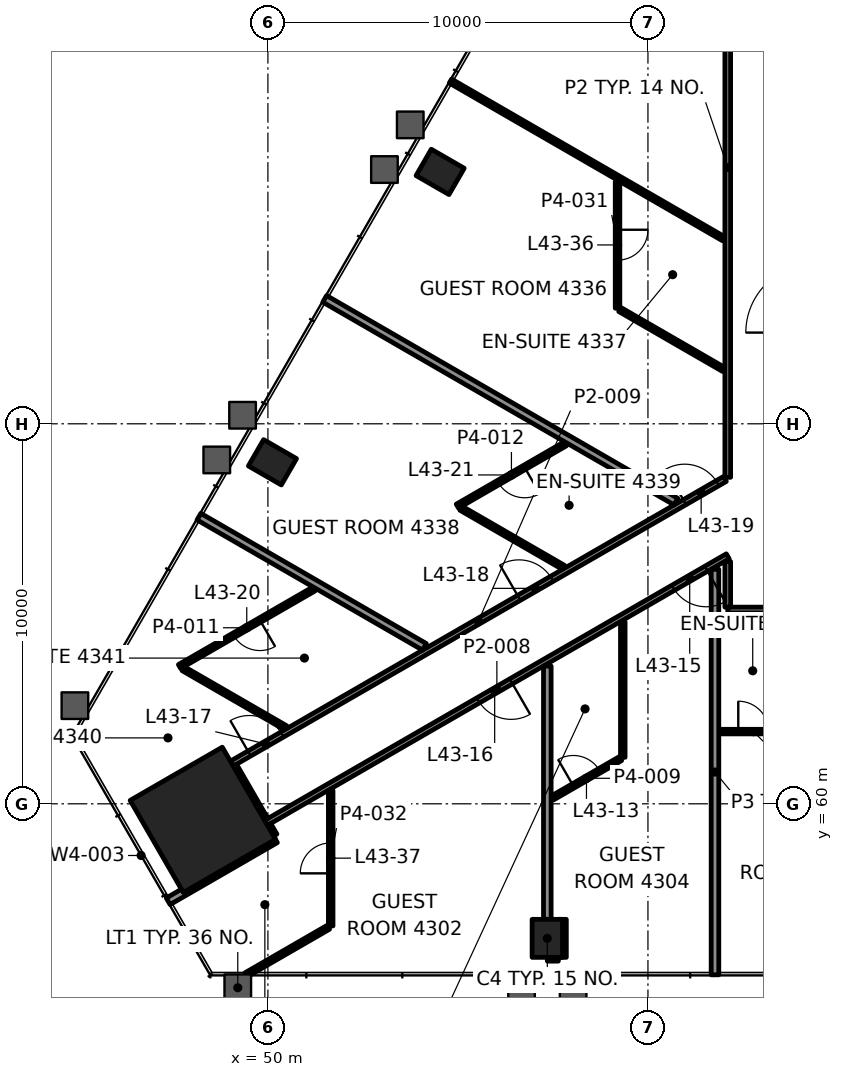
"""IFC4 building model, lengths in metres.
Left out: names, types, materials, properties, quantities, classifications, styles, units other than length and angle.
Written with IfcOpenShell. Run it as: python <this file> out.ifc"""

import sys

from ifc_helpers import new_model, si_unit, direction, frame, frame_2d, origin, origin_2d, place, context, subcontext, project, spatial, rectangle, hollow_rectangle, extrude, element, fill, save


model = new_model("IFC4")
c1 = context("Model", 3, precision=1e-05, world=origin(), true_north=direction((0.0, 1.0)))
c2 = subcontext(c1, "Body", "Model", "MODEL_VIEW")
j1 = project(units=[si_unit("LENGTHUNIT", "METRE"), si_unit("PLANEANGLEUNIT", "RADIAN")], contexts=[c1])
p1 = place(None, origin())
s1 = spatial("IfcSite", under=j1, at=p1, CompositionType="ELEMENT")
p2 = place(p1, origin())
s2 = spatial("IfcBuilding", under=s1, at=p2, CompositionType="ELEMENT")
p3 = place(p2, frame((0.0, 0.0, 187.0)))
s3 = spatial("IfcBuildingStorey", under=s2, at=p3, CompositionType="ELEMENT", Elevation=187.0)
p4 = place(p3, frame((48.287, 59.577, 0.0), z_axis=(0.0, 0.0, 1.0), x_axis=(0.5, -0.866025403784, 0.0)))
e1 = element("IfcColumn", 1, at=p4, inside=s3, PredefinedType="COLUMN", context=c2, shape_type="SweptSolid", body=[
    extrude(rectangle(XDim=2.8, YDim=2.8, at=origin_2d()), origin(), (0.0, 0.0, 1.0), 3.9),
])
for number, where, z_axis, x_axis in (
    (2, (57.352, 56.46, -0.0), (0.0, 0.0, 1.0), (1.0, 0.0, 0.0)),
    (3, (54.532, 76.628, -0.0), (0.0, 0.0, 1.0), (-0.5, -0.866, 0.0)),
    (4, (50.12, 68.987, -0.0), (0.0, 0.0, 1.0), (-0.5, -0.866, 0.0)),
):
    element("IfcColumn", number, at=place(p3, frame(where, z_axis=z_axis, x_axis=x_axis)), inside=s3, PredefinedType="COLUMN", context=c2, shape_type="SweptSolid", body=[
        extrude(hollow_rectangle(XDim=0.8, YDim=1.0, WallThickness=0.05, at=origin_2d()), origin(), (0.0, 0.0, 1.0), 3.9),
    ])
p5 = place(p3, frame((57.352, 55.96, 0.0), z_axis=(0.0, 0.0, 1.0), x_axis=(1.0, 0.0, 0.0)))
e5 = element("IfcWall", 5, at=p5, inside=s3, PredefinedType="PARTITIONING", context=c2, shape_type="SweptSolid", body=[
    extrude(rectangle(XDim=0.29, YDim=0.2, at=frame_2d((0.145, 0.0))), origin(), (0.0, 0.0, 1.0), 3.1),
])
p6 = place(p3, frame((61.864, 61.9, 0.0), z_axis=(0.0, 0.0, 1.0), x_axis=(1.0, 0.0, 0.0)))
e6 = element("IfcWall", 6, at=p6, inside=s3, PredefinedType="PARTITIONING", context=c2, shape_type="SweptSolid", body=[
    extrude(rectangle(XDim=1.825, YDim=0.12, at=frame_2d((0.913, 0.0))), origin(), (0.0, 0.0, 1.0), 3.1),
])
p7 = place(p6, frame((0.513, 0.0, 0.0)))
e7 = element("IfcOpeningElement", 7, at=p7, cuts=e6, PredefinedType="OPENING", context=c2, shape_type="SweptSolid", body=[
    extrude(rectangle(XDim=0.8, YDim=2.1, at=frame_2d((0.4, 1.05))), frame((0.0, 0.07, 0.0), z_axis=(0.0, -1.0, 0.0), x_axis=(1.0, 0.0, 0.0)), (0.0, 0.0, 1.0), 0.14),
])
p8 = place(p3, frame((87.9, 65.1, 0.0), z_axis=(0.0, 0.0, 1.0), x_axis=(-1.0, 0.0, 0.0)))
e8 = element("IfcWall", 8, at=p8, inside=s3, PredefinedType="PARTITIONING", context=c2, shape_type="SweptSolid", body=[
    extrude(rectangle(XDim=25.8, YDim=0.15, at=frame_2d((12.9, 0.0))), origin(), (0.0, 0.0, 1.0), 3.1),
])
p9 = place(p8, frame((2.264, 0.0, 0.0)))
e9 = element("IfcOpeningElement", 9, at=p9, cuts=e8, PredefinedType="OPENING", context=c2, shape_type="SweptSolid", body=[
    extrude(rectangle(XDim=1.0, YDim=2.1, at=frame_2d((0.5, 1.05))), frame((0.0, 0.085, 0.0), z_axis=(0.0, -1.0, 0.0), x_axis=(1.0, 0.0, 0.0)), (0.0, 0.0, 1.0), 0.17),
])
p10 = place(p8, frame((10.244, 0.0, 0.0)))
e10 = element("IfcOpeningElement", 10, at=p10, cuts=e8, PredefinedType="OPENING", context=c2, shape_type="SweptSolid", body=[
    extrude(rectangle(XDim=0.9, YDim=2.1, at=frame_2d((0.45, 1.05))), frame((0.0, 0.085, 0.0), z_axis=(0.0, -1.0, 0.0), x_axis=(1.0, 0.0, 0.0)), (0.0, 0.0, 1.0), 0.17),
])
p11 = place(p8, frame((18.135, 0.0, 0.0)))
e11 = element("IfcOpeningElement", 11, at=p11, cuts=e8, PredefinedType="OPENING", context=c2, shape_type="SweptSolid", body=[
    extrude(rectangle(XDim=1.0, YDim=2.1, at=frame_2d((0.5, 1.05))), frame((0.0, 0.085, 0.0), z_axis=(0.0, -1.0, 0.0), x_axis=(1.0, 0.0, 0.0)), (0.0, 0.0, 1.0), 0.17),
])
p12 = place(p8, frame((21.936, 0.0, 0.0)))
e12 = element("IfcOpeningElement", 12, at=p12, cuts=e8, PredefinedType="OPENING", context=c2, shape_type="SweptSolid", body=[
    extrude(rectangle(XDim=1.0, YDim=2.1, at=frame_2d((0.5, 1.05))), frame((0.0, 0.085, 0.0), z_axis=(0.0, -1.0, 0.0), x_axis=(1.0, 0.0, 0.0)), (0.0, 0.0, 1.0), 0.17),
])
p13 = place(p3, frame((49.424, 55.5, 0.0), z_axis=(0.0, 0.0, 1.0), x_axis=(0.866037780095, 0.499978562988, 0.0)))
e13 = element("IfcWall", 13, at=p13, inside=s3, PredefinedType="PARTITIONING", context=c2, shape_type="SweptSolid", body=[
    extrude(rectangle(XDim=2.503, YDim=0.12, at=frame_2d((1.251, 0.0))), origin(), (0.0, 0.0, 1.0), 3.1),
])
p14 = place(p3, frame((57.487, 60.155, 0.0), z_axis=(0.0, 0.0, 1.0), x_axis=(0.866018462269, 0.500012022864, 0.0)))
e14 = element("IfcWall", 14, at=p14, inside=s3, PredefinedType="PARTITIONING", context=c2, shape_type="SweptSolid", body=[
    extrude(rectangle(XDim=2.068, YDim=0.12, at=frame_2d((1.034, 0.0))), origin(), (0.0, 0.0, 1.0), 3.1),
])
p15 = place(p14, frame((0.634, 0.0, 0.0)))
e15 = element("IfcOpeningElement", 15, at=p15, cuts=e14, PredefinedType="OPENING", context=c2, shape_type="SweptSolid", body=[
    extrude(rectangle(XDim=0.8, YDim=2.1, at=frame_2d((0.4, 1.05))), frame((0.0, 0.07, 0.0), z_axis=(0.0, -1.0, 0.0), x_axis=(1.0, 0.0, 0.0)), (0.0, 0.0, 1.0), 0.14),
])
p16 = place(p3, frame((47.376, 57.435, 0.0), z_axis=(0.0, 0.0, 1.0), x_axis=(0.866035906198, 0.499981808845, 0.0)))
e16 = element("IfcWall", 16, at=p16, inside=s3, PredefinedType="PARTITIONING", context=c2, shape_type="SweptSolid", body=[
    extrude(rectangle(XDim=3.259, YDim=0.2, at=frame_2d((1.63, 0.0))), origin(), (0.0, 0.0, 1.0), 3.1),
])
p17 = place(p3, frame((62.1, 66.513, 0.0), z_axis=(0.0, 0.0, 1.0), x_axis=(-0.866025334814, -0.500000119461, 0.0)))
e17 = element("IfcWall", 17, at=p17, inside=s3, PredefinedType="PARTITIONING", context=c2, shape_type="SweptSolid", body=[
    extrude(rectangle(XDim=14.03, YDim=0.15, at=frame_2d((7.015, 0.0))), origin(), (0.0, 0.0, 1.0), 2.947),
])
p18 = place(p17, frame((0.656, 0.0, 0.0)))
e18 = element("IfcOpeningElement", 18, at=p18, cuts=e17, PredefinedType="OPENING", context=c2, shape_type="SweptSolid", body=[
    extrude(rectangle(XDim=1.0, YDim=2.1, at=frame_2d((0.5, 1.05))), frame((0.0, 0.085, 0.0), z_axis=(0.0, -1.0, 0.0), x_axis=(1.0, 0.0, 0.0)), (0.0, 0.0, 1.0), 0.17),
])
p19 = place(p17, frame((6.582, 0.0, 0.0)))
e19 = element("IfcOpeningElement", 19, at=p19, cuts=e17, PredefinedType="OPENING", context=c2, shape_type="SweptSolid", body=[
    extrude(rectangle(XDim=1.0, YDim=2.1, at=frame_2d((0.5, 1.05))), frame((0.0, 0.085, 0.0), z_axis=(0.0, -1.0, 0.0), x_axis=(1.0, 0.0, 0.0)), (0.0, 0.0, 1.0), 0.17),
])
p20 = place(p3, frame((49.05, 61.057, 0.0), z_axis=(0.0, 0.0, 1.0), x_axis=(0.866027379905, 0.499996577244, 0.0)))
e20 = element("IfcWall", 20, at=p20, inside=s3, PredefinedType="PARTITIONING", context=c2, shape_type="SweptSolid", body=[
    extrude(rectangle(XDim=14.982, YDim=0.15, at=frame_2d((7.491, 0.0))), origin(), (0.0, 0.0, 1.0), 3.1),
])
p21 = place(p20, frame((0.532, 0.0, 0.0)))
e21 = element("IfcOpeningElement", 21, at=p21, cuts=e20, PredefinedType="OPENING", context=c2, shape_type="SweptSolid", body=[
    extrude(rectangle(XDim=1.0, YDim=2.1, at=frame_2d((0.5, 1.05))), frame((0.0, 0.085, 0.0), z_axis=(0.0, -1.0, 0.0), x_axis=(1.0, 0.0, 0.0)), (0.0, 0.0, 1.0), 0.17),
])
p22 = place(p20, frame((8.725, 0.0, 0.0)))
e22 = element("IfcOpeningElement", 22, at=p22, cuts=e20, PredefinedType="OPENING", context=c2, shape_type="SweptSolid", body=[
    extrude(rectangle(XDim=1.0, YDim=2.1, at=frame_2d((0.5, 1.05))), frame((0.0, 0.085, 0.0), z_axis=(0.0, -1.0, 0.0), x_axis=(1.0, 0.0, 0.0)), (0.0, 0.0, 1.0), 0.17),
])
p23 = place(p20, frame((13.76, 0.0, 0.0)))
e23 = element("IfcOpeningElement", 23, at=p23, cuts=e20, PredefinedType="OPENING", context=c2, shape_type="SweptSolid", body=[
    extrude(rectangle(XDim=1.0, YDim=2.1, at=frame_2d((0.5, 1.05))), frame((0.0, 0.085, 0.0), z_axis=(0.0, -1.0, 0.0), x_axis=(1.0, 0.0, 0.0)), (0.0, 0.0, 1.0), 0.17),
])
p24 = place(p3, frame((51.212, 65.654, 0.0), z_axis=(0.0, 0.0, 1.0), x_axis=(-0.866038243659, -0.499977760025, 0.0)))
e24 = element("IfcWall", 24, at=p24, inside=s3, PredefinedType="PARTITIONING", context=c2, shape_type="SweptSolid", body=[
    extrude(rectangle(XDim=4.084, YDim=0.12, at=frame_2d((2.042, 0.0))), origin(), (0.0, 0.0, 1.0), 3.1),
])
p25 = place(p24, frame((1.642, 0.0, 0.0)))
e25 = element("IfcOpeningElement", 25, at=p25, cuts=e24, PredefinedType="OPENING", context=c2, shape_type="SweptSolid", body=[
    extrude(rectangle(XDim=0.8, YDim=2.1, at=frame_2d((0.4, 1.05))), frame((0.0, 0.07, 0.0), z_axis=(0.0, -1.0, 0.0), x_axis=(1.0, 0.0, 0.0)), (0.0, 0.0, 1.0), 0.14),
])
p26 = place(p3, frame((57.83, 69.475, 0.0), z_axis=(0.0, 0.0, 1.0), x_axis=(-0.866038236991, -0.499977771575, 0.0)))
e26 = element("IfcWall", 26, at=p26, inside=s3, PredefinedType="PARTITIONING", context=c2, shape_type="SweptSolid", body=[
    extrude(rectangle(XDim=3.283, YDim=0.12, at=frame_2d((1.642, 0.0))), origin(), (0.0, 0.0, 1.0), 3.1),
])
p27 = place(p26, frame((1.242, 0.0, 0.0)))
e27 = element("IfcOpeningElement", 27, at=p27, cuts=e26, PredefinedType="OPENING", context=c2, shape_type="SweptSolid", body=[
    extrude(rectangle(XDim=0.8, YDim=2.1, at=frame_2d((0.4, 1.05))), frame((0.0, 0.07, 0.0), z_axis=(0.0, -1.0, 0.0), x_axis=(1.0, 0.0, 0.0)), (0.0, 0.0, 1.0), 0.14),
])
p28 = place(p3, frame((62.1, 65.175, 0.0), z_axis=(0.0, 0.0, 1.0), x_axis=(0.0, 1.0, 0.0)))
e28 = element("IfcWall", 28, at=p28, inside=s3, PredefinedType="PARTITIONING", context=c2, shape_type="SweptSolid", body=[
    extrude(rectangle(XDim=1.201, YDim=0.15, at=frame_2d((0.601, 0.0))), origin(), (0.0, 0.0, 1.0), 2.947),
])
p29 = place(p3, frame((62.1, 68.591, 0.0), z_axis=(0.0, 0.0, 1.0), x_axis=(0.0, 1.0, 0.0)))
e29 = element("IfcWall", 29, at=p29, inside=s3, PredefinedType="PARTITIONING", context=c2, shape_type="SweptSolid", body=[
    extrude(rectangle(XDim=16.308, YDim=0.15, at=frame_2d((8.154, 0.0))), origin(), (0.0, 0.0, 1.0), 3.1),
])
p30 = place(p3, frame((61.764, 55.5, 0.0), z_axis=(0.0, 0.0, 1.0), x_axis=(0.0, 1.0, 0.0)))
e30 = element("IfcWall", 30, at=p30, inside=s3, PredefinedType="PARTITIONING", context=c2, shape_type="SweptSolid", body=[
    extrude(rectangle(XDim=10.673, YDim=0.2, at=frame_2d((5.336, 0.0))), origin(), (0.0, 0.0, 1.0), 2.947),
])
p31 = place(p3, frame((59.338, 61.223, 0.0), z_axis=(0.0, 0.0, 1.0), x_axis=(0.0, 1.0, 0.0)))
e31 = element("IfcWall", 31, at=p31, inside=s3, PredefinedType="PARTITIONING", context=c2, shape_type="SweptSolid", body=[
    extrude(rectangle(XDim=3.568, YDim=0.12, at=frame_2d((1.784, 0.0))), origin(), (0.0, 0.0, 1.0), 2.947),
])
p32 = place(p3, frame((59.2, 76.371, 0.0), z_axis=(0.0, 0.0, 1.0), x_axis=(0.0, -1.0, 0.0)))
e32 = element("IfcWall", 32, at=p32, inside=s3, PredefinedType="PARTITIONING", context=c2, shape_type="SweptSolid", body=[
    extrude(rectangle(XDim=3.329, YDim=0.12, at=frame_2d((1.665, 0.0))), origin(), (0.0, 0.0, 1.0), 3.1),
])
p33 = place(p32, frame((1.265, 0.0, 0.0)))
e33 = element("IfcOpeningElement", 33, at=p33, cuts=e32, PredefinedType="OPENING", context=c2, shape_type="SweptSolid", body=[
    extrude(rectangle(XDim=0.8, YDim=2.1, at=frame_2d((0.4, 1.05))), frame((0.0, 0.07, 0.0), z_axis=(0.0, -1.0, 0.0), x_axis=(1.0, 0.0, 0.0)), (0.0, 0.0, 1.0), 0.14),
])
p34 = place(p3, frame((57.752, 55.96, 0.0), z_axis=(0.0, 0.0, 1.0), x_axis=(0.0, 1.0, 0.0)))
e34 = element("IfcWall", 34, at=p34, inside=s3, PredefinedType="PARTITIONING", context=c2, shape_type="SweptSolid", body=[
    extrude(rectangle(XDim=1.0, YDim=0.2, at=frame_2d((0.5, 0.0))), origin(), (0.0, 0.0, 1.0), 3.022),
])
p35 = place(p3, frame((57.352, 56.96, 0.0), z_axis=(0.0, 0.0, 1.0), x_axis=(0.0, 1.0, 0.0)))
e35 = element("IfcWall", 35, at=p35, inside=s3, PredefinedType="PARTITIONING", context=c2, shape_type="SweptSolid", body=[
    extrude(rectangle(XDim=6.666, YDim=0.2, at=frame_2d((3.333, 0.0))), origin(), (0.0, 0.0, 1.0), 3.1),
])
p36 = place(p3, frame((51.652, 56.786, 0.0), z_axis=(0.0, 0.0, 1.0), x_axis=(0.0, 1.0, 0.0)))
e36 = element("IfcWall", 36, at=p36, inside=s3, PredefinedType="PARTITIONING", context=c2, shape_type="SweptSolid", body=[
    extrude(rectangle(XDim=3.568, YDim=0.12, at=frame_2d((1.784, 0.0))), origin(), (0.0, 0.0, 1.0), 3.1),
])
p37 = place(p36, frame((1.384, 0.0, 0.0)))
e37 = element("IfcOpeningElement", 37, at=p37, cuts=e36, PredefinedType="OPENING", context=c2, shape_type="SweptSolid", body=[
    extrude(rectangle(XDim=0.8, YDim=2.1, at=frame_2d((0.4, 1.05))), frame((0.0, 0.07, 0.0), z_axis=(0.0, -1.0, 0.0), x_axis=(1.0, 0.0, 0.0)), (0.0, 0.0, 1.0), 0.14),
])
p38 = place(p3, frame((50.15, 59.152, 0.0), z_axis=(0.0, 0.0, 1.0), x_axis=(-0.499939380126, 0.866060399857, 0.0)))
e38 = element("IfcWall", 38, at=p38, inside=s3, PredefinedType="PARTITIONING", context=c2, shape_type="SweptSolid", body=[
    extrude(rectangle(XDim=0.325, YDim=0.2, at=frame_2d((0.162, 0.0))), origin(), (0.0, 0.0, 1.0), 3.1),
])
p39 = place(p3, frame((61.99, 74.869, 0.0), z_axis=(0.0, 0.0, 1.0), x_axis=(-0.866025877972, 0.499999178681, 0.0)))
e39 = element("IfcWall", 39, at=p39, inside=s3, PredefinedType="PARTITIONING", context=c2, shape_type="SweptSolid", body=[
    extrude(rectangle(XDim=8.299, YDim=0.12, at=frame_2d((4.149, 0.0))), origin(), (0.0, 0.0, 1.0), 3.022),
])
p40 = place(p3, frame((61.99, 71.431, 0.0), z_axis=(0.0, 0.0, 1.0), x_axis=(-0.866028267601, 0.499995039691, 0.0)))
e40 = element("IfcWall", 40, at=p40, inside=s3, PredefinedType="PARTITIONING", context=c2, shape_type="SweptSolid", body=[
    extrude(rectangle(XDim=3.153, YDim=0.12, at=frame_2d((1.576, 0.0))), origin(), (0.0, 0.0, 1.0), 3.1),
])
p41 = place(p3, frame((60.737, 67.951, 0.0), z_axis=(0.0, 0.0, 1.0), x_axis=(-0.866024451315, 0.500001649722, 0.0)))
e41 = element("IfcWall", 41, at=p41, inside=s3, PredefinedType="PARTITIONING", context=c2, shape_type="SweptSolid", body=[
    extrude(rectangle(XDim=10.673, YDim=0.2, at=frame_2d((5.336, 0.0))), origin(), (0.0, 0.0, 1.0), 3.022),
])
p42 = place(p3, frame((57.776, 66.222, 0.0), z_axis=(0.0, 0.0, 1.0), x_axis=(-0.866009247561, 0.500027982357, 0.0)))
e42 = element("IfcWall", 42, at=p42, inside=s3, PredefinedType="PARTITIONING", context=c2, shape_type="SweptSolid", body=[
    extrude(rectangle(XDim=3.113, YDim=0.12, at=frame_2d((1.556, 0.0))), origin(), (0.0, 0.0, 1.0), 3.1),
])
p43 = place(p3, frame((54.119, 64.13, 0.0), z_axis=(0.0, 0.0, 1.0), x_axis=(-0.866017662945, 0.500013407287, 0.0)))
e43 = element("IfcWall", 43, at=p43, inside=s3, PredefinedType="PARTITIONING", context=c2, shape_type="SweptSolid", body=[
    extrude(rectangle(XDim=6.852, YDim=0.2, at=frame_2d((3.426, 0.0))), origin(), (0.0, 0.0, 1.0), 3.1),
])
p44 = place(p3, frame((50.466, 62.001, 0.0), z_axis=(0.0, 0.0, 1.0), x_axis=(-0.866028856698, 0.499994019331, 0.0)))
e44 = element("IfcWall", 44, at=p44, inside=s3, PredefinedType="PARTITIONING", context=c2, shape_type="SweptSolid", body=[
    extrude(rectangle(XDim=3.113, YDim=0.12, at=frame_2d((1.556, 0.0))), origin(), (0.0, 0.0, 1.0), 3.1),
])
p45 = place(p3, frame((49.912, 59.563, 0.0), z_axis=(0.0, 0.0, 1.0), x_axis=(-0.500055614084, 0.865993292597, 0.0)))
e45 = element("IfcWall", 45, at=p45, inside=s3, PredefinedType="PARTITIONING", context=c2, shape_type="SweptSolid", body=[
    extrude(rectangle(XDim=1.649, YDim=0.2, at=frame_2d((0.825, 0.0))), origin(), (0.0, 0.0, 1.0), 2.947),
])
p46 = place(p7, origin())
e46 = element("IfcDoor", 46, at=p46, inside=s3, OperationType="SINGLE_SWING_RIGHT", PredefinedType="DOOR", context=c2, shape_type="SweptSolid", body=[
    extrude(rectangle(XDim=0.8, YDim=2.1, at=frame_2d((0.4, 1.05))), frame((0.0, 0.025, 0.0), z_axis=(0.0, -1.0, 0.0), x_axis=(1.0, 0.0, 0.0)), (0.0, 0.0, 1.0), 0.05),
])
fill(e7, e46)
p47 = place(p15, origin())
e47 = element("IfcDoor", 47, at=p47, inside=s3, OperationType="SINGLE_SWING_RIGHT", PredefinedType="DOOR", context=c2, shape_type="SweptSolid", body=[
    extrude(rectangle(XDim=0.8, YDim=2.1, at=frame_2d((0.4, 1.05))), frame((0.0, 0.025, 0.0), z_axis=(0.0, -1.0, 0.0), x_axis=(1.0, 0.0, 0.0)), (0.0, 0.0, 1.0), 0.05),
])
fill(e15, e47)
p48 = place(p18, origin())
e48 = element("IfcDoor", 48, at=p48, inside=s3, OperationType="SINGLE_SWING_RIGHT", PredefinedType="DOOR", context=c2, shape_type="SweptSolid", body=[
    extrude(rectangle(XDim=1.0, YDim=2.1, at=frame_2d((0.5, 1.05))), frame((0.0, 0.025, 0.0), z_axis=(0.0, -1.0, 0.0), x_axis=(1.0, 0.0, 0.0)), (0.0, 0.0, 1.0), 0.05),
])
fill(e18, e48)
p49 = place(p19, origin())
e49 = element("IfcDoor", 49, at=p49, inside=s3, OperationType="SINGLE_SWING_RIGHT", PredefinedType="DOOR", context=c2, shape_type="SweptSolid", body=[
    extrude(rectangle(XDim=1.0, YDim=2.1, at=frame_2d((0.5, 1.05))), frame((0.0, 0.025, 0.0), z_axis=(0.0, -1.0, 0.0), x_axis=(1.0, 0.0, 0.0)), (0.0, 0.0, 1.0), 0.05),
])
fill(e19, e49)
p50 = place(p21, origin())
e50 = element("IfcDoor", 50, at=p50, inside=s3, OperationType="SINGLE_SWING_LEFT", PredefinedType="DOOR", context=c2, shape_type="SweptSolid", body=[
    extrude(rectangle(XDim=1.0, YDim=2.1, at=frame_2d((0.5, 1.05))), frame((0.0, 0.025, 0.0), z_axis=(0.0, -1.0, 0.0), x_axis=(1.0, 0.0, 0.0)), (0.0, 0.0, 1.0), 0.05),
])
fill(e21, e50)
p51 = place(p22, origin())
e51 = element("IfcDoor", 51, at=p51, inside=s3, OperationType="SINGLE_SWING_LEFT", PredefinedType="DOOR", context=c2, shape_type="SweptSolid", body=[
    extrude(rectangle(XDim=1.0, YDim=2.1, at=frame_2d((0.5, 1.05))), frame((0.0, 0.025, 0.0), z_axis=(0.0, -1.0, 0.0), x_axis=(1.0, 0.0, 0.0)), (0.0, 0.0, 1.0), 0.05),
])
fill(e22, e51)
p52 = place(p23, origin())
e52 = element("IfcDoor", 52, at=p52, inside=s3, OperationType="SINGLE_SWING_LEFT", PredefinedType="DOOR", context=c2, shape_type="SweptSolid", body=[
    extrude(rectangle(XDim=1.0, YDim=2.1, at=frame_2d((0.5, 1.05))), frame((0.0, 0.025, 0.0), z_axis=(0.0, -1.0, 0.0), x_axis=(1.0, 0.0, 0.0)), (0.0, 0.0, 1.0), 0.05),
])
fill(e23, e52)
p53 = place(p25, origin())
e53 = element("IfcDoor", 53, at=p53, inside=s3, OperationType="SINGLE_SWING_LEFT", PredefinedType="DOOR", context=c2, shape_type="SweptSolid", body=[
    extrude(rectangle(XDim=0.8, YDim=2.1, at=frame_2d((0.4, 1.05))), frame((0.0, 0.025, 0.0), z_axis=(0.0, -1.0, 0.0), x_axis=(1.0, 0.0, 0.0)), (0.0, 0.0, 1.0), 0.05),
])
fill(e25, e53)
p54 = place(p27, origin())
e54 = element("IfcDoor", 54, at=p54, inside=s3, OperationType="SINGLE_SWING_LEFT", PredefinedType="DOOR", context=c2, shape_type="SweptSolid", body=[
    extrude(rectangle(XDim=0.8, YDim=2.1, at=frame_2d((0.4, 1.05))), frame((0.0, 0.025, 0.0), z_axis=(0.0, -1.0, 0.0), x_axis=(1.0, 0.0, 0.0)), (0.0, 0.0, 1.0), 0.05),
])
fill(e27, e54)
p55 = place(p33, origin())
e55 = element("IfcDoor", 55, at=p55, inside=s3, OperationType="SINGLE_SWING_LEFT", PredefinedType="DOOR", context=c2, shape_type="SweptSolid", body=[
    extrude(rectangle(XDim=0.8, YDim=2.1, at=frame_2d((0.4, 1.05))), frame((0.0, 0.025, 0.0), z_axis=(0.0, -1.0, 0.0), x_axis=(1.0, 0.0, 0.0)), (0.0, 0.0, 1.0), 0.05),
])
fill(e33, e55)
p56 = place(p37, origin())
e56 = element("IfcDoor", 56, at=p56, inside=s3, OperationType="SINGLE_SWING_RIGHT", PredefinedType="DOOR", context=c2, shape_type="SweptSolid", body=[
    extrude(rectangle(XDim=0.8, YDim=2.1, at=frame_2d((0.4, 1.05))), frame((0.0, 0.025, 0.0), z_axis=(0.0, -1.0, 0.0), x_axis=(1.0, 0.0, 0.0)), (0.0, 0.0, 1.0), 0.05),
])
fill(e37, e56)
p57 = place(p3, origin())
p58 = place(p57, frame((51.471, 55.485, 0.15), z_axis=(0.0, 0.0, 1.0), x_axis=(1.0, 0.0, 0.0)))
p59 = place(p58, origin())
e57 = element("IfcWindow", 57, at=p59, inside=s3, PartitioningType="SINGLE_PANEL", PredefinedType="WINDOW", context=c2, shape_type="SweptSolid", body=[
    extrude(rectangle(XDim=2.866, YDim=3.55, at=frame_2d((1.433, 1.775))), frame((0.0, 0.03, 0.0), z_axis=(0.0, -1.0, 0.0), x_axis=(1.0, 0.0, 0.0)), (0.0, 0.0, 1.0), 0.06),
])
save(model, sys.argv[1])
